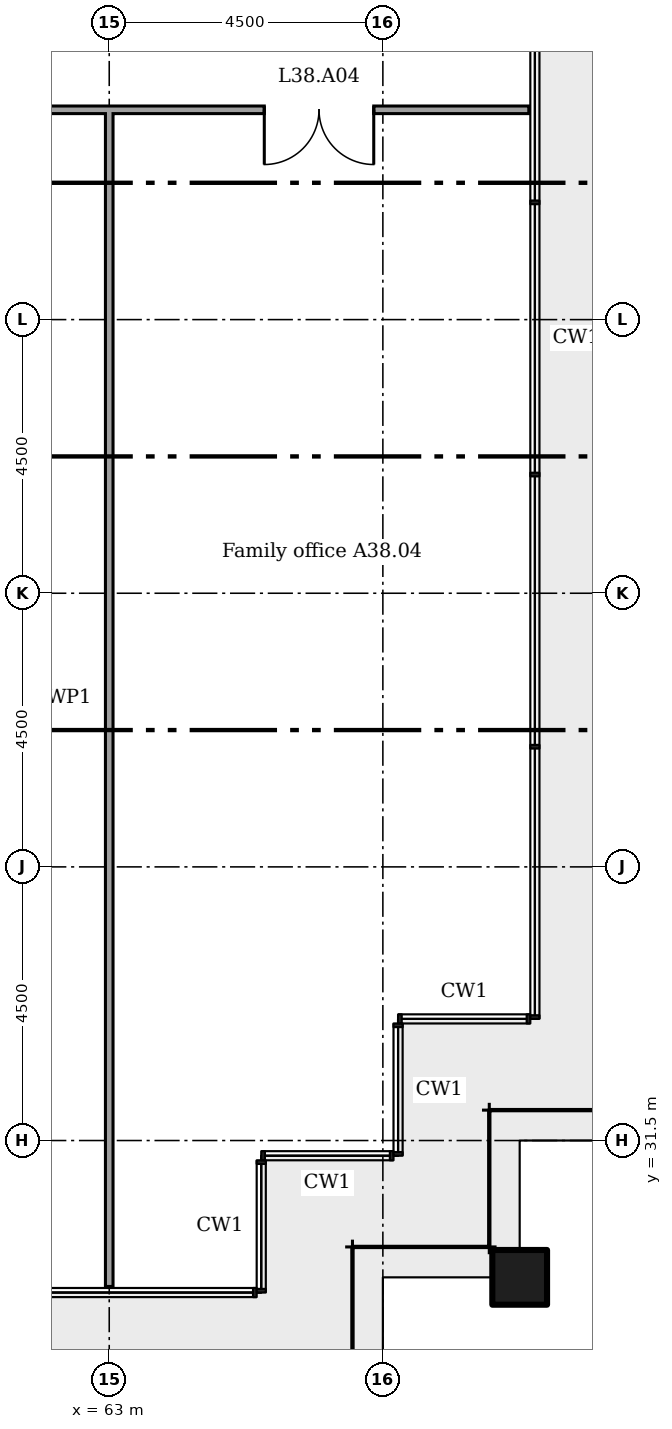
"""IFC4 building model, lengths in metres.
Left out: names, types, materials, properties, quantities, classifications, styles, units other than length and angle.
Written with IfcOpenShell. Run it as: python <this file> out.ifc"""

import sys

from ifc_helpers import new_model, si_unit, direction, frame, frame_2d, origin, origin_2d, place, context, subcontext, project, spatial, rectangle, extrude, element, fill, save


model = new_model("IFC4")
c1 = context("Model", 3, precision=1e-05, world=origin(), true_north=direction((0.0, 1.0)))
c2 = subcontext(c1, "Body", "Model", "MODEL_VIEW")
j1 = project(units=[si_unit("LENGTHUNIT", "METRE"), si_unit("PLANEANGLEUNIT", "RADIAN")], contexts=[c1])
p1 = place(None, origin())
s1 = spatial("IfcSite", under=j1, at=p1, CompositionType="ELEMENT")
p2 = place(p1, origin())
s2 = spatial("IfcBuilding", under=s1, at=p2, CompositionType="ELEMENT")
p3 = place(p2, frame((0.0, 0.0, 154.6)))
s3 = spatial("IfcBuildingStorey", under=s2, at=p3, CompositionType="ELEMENT", Elevation=154.6)
p4 = place(p3, frame((69.75, 29.25, 0.0)))
e1 = element("IfcColumn", 1, at=p4, inside=s3, PredefinedType="COLUMN", context=c2, shape_type="SweptSolid", body=[
    extrude(rectangle(XDim=0.9, YDim=0.9, at=origin_2d()), origin(), (0.0, 0.0, 1.0), 3.6),
])
p5 = place(p3, frame((60.238, 48.45, 0.0)))
e2 = element("IfcWall", 2, at=p5, inside=s3, PredefinedType="PARTITIONING", context=c2, shape_type="SweptSolid", body=[
    extrude(rectangle(XDim=9.662, YDim=0.125, at=frame_2d((4.831, 0.0))), origin(), (0.0, 0.0, 1.0), 3.45),
])
p6 = place(p5, frame((5.312, 0.0, 0.0)))
e3 = element("IfcOpeningElement", 3, at=p6, cuts=e2, PredefinedType="OPENING", context=c2, shape_type="SweptSolid", body=[
    extrude(rectangle(XDim=1.8, YDim=2.1, at=frame_2d((0.9, 1.05))), frame((0.0, 0.073, 0.0), z_axis=(0.0, -1.0, 0.0), x_axis=(1.0, 0.0, 0.0)), (0.0, 0.0, 1.0), 0.145),
])
p7 = place(p3, frame((63.0, 29.1, 0.0), z_axis=(0.0, 0.0, 1.0), x_axis=(0.0, 1.0, 0.0)))
e4 = element("IfcWall", 4, at=p7, inside=s3, PredefinedType="PARTITIONING", context=c2, shape_type="SweptSolid", body=[
    extrude(rectangle(XDim=19.35, YDim=0.125, at=frame_2d((9.675, 0.0))), origin(), (0.0, 0.0, 1.0), 3.45),
])
p8 = place(p6, frame((1.8, 0.0, 0.0), x_axis=(-1.0, 0.0, 0.0)))
e5 = element("IfcDoor", 5, at=p8, inside=s3, OperationType="DOUBLE_DOOR_SINGLE_SWING", PredefinedType="DOOR", context=c2, shape_type="SweptSolid", body=[
    extrude(rectangle(XDim=1.8, YDim=2.1, at=frame_2d((0.9, 1.05))), frame((0.0, 0.025, 0.0), z_axis=(0.0, -1.0, 0.0), x_axis=(1.0, 0.0, 0.0)), (0.0, 0.0, 1.0), 0.05),
])
fill(e3, e5)
save(model, sys.argv[1])
